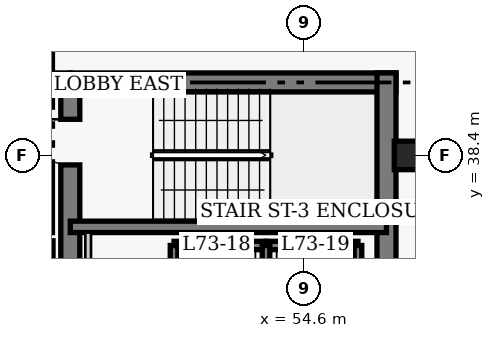
"""IFC4 building model, lengths in metres.
Left out: names, types, materials, properties, quantities, classifications, styles, units other than length and angle.
Written with IfcOpenShell. Run it as: python <this file> out.ifc"""

import sys

from ifc_helpers import new_model, si_unit, direction, frame, frame_2d, origin, origin_2d, place, context, subcontext, project, spatial, rectangle, extrude, element, fill, save


model = new_model("IFC4")
c1 = context("Model", 3, precision=1e-05, world=origin(), true_north=direction((0.0, 1.0)))
c2 = subcontext(c1, "Body", "Model", "MODEL_VIEW")
j1 = project(units=[si_unit("LENGTHUNIT", "METRE"), si_unit("PLANEANGLEUNIT", "RADIAN")], contexts=[c1])
p1 = place(None, origin())
s1 = spatial("IfcSite", under=j1, at=p1, CompositionType="ELEMENT")
p2 = place(p1, origin())
s2 = spatial("IfcBuilding", under=s1, at=p2, CompositionType="ELEMENT")
p3 = place(p2, frame((0.0, 0.0, 293.4)))
s3 = spatial("IfcBuildingStorey", under=s2, at=p3, CompositionType="ELEMENT", Elevation=293.4)
p4 = place(p3, frame((35.85, 40.32, 0.0), z_axis=(0.0, 0.0, 1.0), x_axis=(1.0, 0.0, 0.0)))
e1 = element("IfcWall", 1, at=p4, inside=s3, PredefinedType="SHEAR", context=c2, shape_type="SweptSolid", body=[
    extrude(rectangle(XDim=12.6, YDim=0.5, at=frame_2d((6.3, 0.0))), origin(), (0.0, 0.0, 1.0), 4.0),
])
p5 = place(p3, frame((48.45, 40.32, 0.0), z_axis=(0.0, 0.0, 1.0), x_axis=(1.0, 0.0, 0.0)))
e2 = element("IfcWall", 2, at=p5, inside=s3, PredefinedType="SHEAR", context=c2, shape_type="SweptSolid", body=[
    extrude(rectangle(XDim=8.57, YDim=0.5, at=frame_2d((4.285, 0.0))), origin(), (0.0, 0.0, 1.0), 4.0),
])
p6 = place(p3, frame((56.77, 27.05, 0.0), z_axis=(0.0, 0.0, 1.0), x_axis=(0.0, 1.0, 0.0)))
e3 = element("IfcWall", 3, at=p6, inside=s3, PredefinedType="SHEAR", context=c2, shape_type="SweptSolid", body=[
    extrude(rectangle(XDim=13.52, YDim=0.5, at=frame_2d((6.76, 0.0))), origin(), (0.0, 0.0, 1.0), 4.0),
])
p7 = place(p3, frame((48.45, 32.5, 0.0), z_axis=(0.0, 0.0, 1.0), x_axis=(0.0, 1.0, 0.0)))
e4 = element("IfcWall", 4, at=p7, inside=s3, PredefinedType="SHEAR", context=c2, shape_type="SweptSolid", body=[
    extrude(rectangle(XDim=7.82, YDim=0.5, at=frame_2d((3.91, 0.0))), origin(), (0.0, 0.0, 1.0), 4.0),
])
p8 = place(p7, frame((5.65, 0.0, 0.0)))
e5 = element("IfcOpeningElement", 5, at=p8, cuts=e4, PredefinedType="OPENING", context=c2, shape_type="SweptSolid", body=[
    extrude(rectangle(XDim=1.2, YDim=2.15, at=frame_2d((0.6, 1.075))), frame((0.0, 0.26, 0.0), z_axis=(0.0, -1.0, 0.0), x_axis=(1.0, 0.0, 0.0)), (0.0, 0.0, 1.0), 0.52),
])
p9 = place(p3, frame((48.45, 36.52, 0.0), z_axis=(0.0, 0.0, 1.0), x_axis=(1.0, 0.0, 0.0)))
e6 = element("IfcWall", 6, at=p9, inside=s3, PredefinedType="SHEAR", context=c2, shape_type="SweptSolid", body=[
    extrude(rectangle(XDim=8.32, YDim=0.3, at=frame_2d((4.16, 0.0))), origin(), (0.0, 0.0, 1.0), 4.0),
])
p10 = place(p3, frame((57.35, 38.4, 0.0), z_axis=(0.0, 0.0, 1.0), x_axis=(1.0, 0.0, 0.0)))
e7 = element("IfcColumn", 7, at=p10, inside=s3, PredefinedType="COLUMN", context=c2, shape_type="SweptSolid", body=[
    extrude(rectangle(XDim=0.75, YDim=0.75, at=origin_2d()), origin(), (0.0, 0.0, 1.0), 4.0),
])
p11 = place(p3, frame((51.18, 36.03, 0.0), z_axis=(0.0, 0.0, 1.0), x_axis=(1.0, 0.0, 0.0)))
e8 = element("IfcWall", 8, at=p11, inside=s3, PredefinedType="SHEAR", context=c2, shape_type="SweptSolid", body=[
    extrude(rectangle(XDim=2.42, YDim=0.22, at=frame_2d((1.21, 0.0))), origin(), (0.0, 0.0, 1.0), 4.0),
])
p12 = place(p3, frame((51.18, 33.17, 0.0), z_axis=(0.0, 0.0, 1.0), x_axis=(0.0, 1.0, 0.0)))
e9 = element("IfcWall", 9, at=p12, inside=s3, PredefinedType="SHEAR", context=c2, shape_type="SweptSolid", body=[
    extrude(rectangle(XDim=2.86, YDim=0.2, at=frame_2d((1.43, 0.0))), origin(), (0.0, 0.0, 1.0), 4.0),
])
p13 = place(p3, frame((53.6, 36.03, 0.0), z_axis=(0.0, 0.0, 1.0), x_axis=(1.0, 0.0, 0.0)))
e10 = element("IfcWall", 10, at=p13, inside=s3, PredefinedType="SHEAR", context=c2, shape_type="SweptSolid", body=[
    extrude(rectangle(XDim=2.42, YDim=0.22, at=frame_2d((1.21, 0.0))), origin(), (0.0, 0.0, 1.0), 4.0),
])
for number, where, z_axis, x_axis in (
    (11, (53.6, 33.17, 0.0), (0.0, 0.0, 1.0), (0.0, 1.0, 0.0)),
    (12, (56.02, 33.17, 0.0), (0.0, 0.0, 1.0), (0.0, 1.0, 0.0)),
):
    element("IfcWall", number, at=place(p3, frame(where, z_axis=z_axis, x_axis=x_axis)), inside=s3, PredefinedType="SHEAR", context=c2, shape_type="SweptSolid", body=[
        extrude(rectangle(XDim=2.86, YDim=0.2, at=frame_2d((1.43, 0.0))), origin(), (0.0, 0.0, 1.0), 4.0),
    ])
p14 = place(p3, frame((47.895, 33.245, 0.0), z_axis=(0.0, 0.0, 1.0), x_axis=(0.0, 1.0, 0.0)))
e13 = element("IfcWall", 13, at=p14, inside=s3, PredefinedType="SHEAR", context=c2, shape_type="SweptSolid", body=[
    extrude(rectangle(XDim=2.91, YDim=0.2, at=frame_2d((1.455, 0.0))), origin(), (0.0, 0.0, 1.0), 4.0),
])
p15 = place(p3, frame((48.92, 32.75, 0.0), z_axis=(0.0, 0.0, 1.0), x_axis=(0.0, 1.0, 0.0)))
e14 = element("IfcWall", 14, at=p15, inside=s3, PredefinedType="PARTITIONING", context=c2, shape_type="SweptSolid", body=[
    extrude(rectangle(XDim=3.62, YDim=0.15, at=frame_2d((1.81, 0.0))), origin(), (0.0, 0.0, 1.0), 3.71),
])
p16 = place(p8, origin())
e15 = element("IfcDoor", 15, at=p16, inside=s3, OperationType="SINGLE_SWING_RIGHT", PredefinedType="DOOR", context=c2, shape_type="SweptSolid", body=[
    extrude(rectangle(XDim=1.2, YDim=2.15, at=frame_2d((0.6, 1.075))), frame((0.0, 0.025, 0.0), z_axis=(0.0, -1.0, 0.0), x_axis=(1.0, 0.0, 0.0)), (0.0, 0.0, 1.0), 0.05),
])
fill(e5, e15)
save(model, sys.argv[1])
